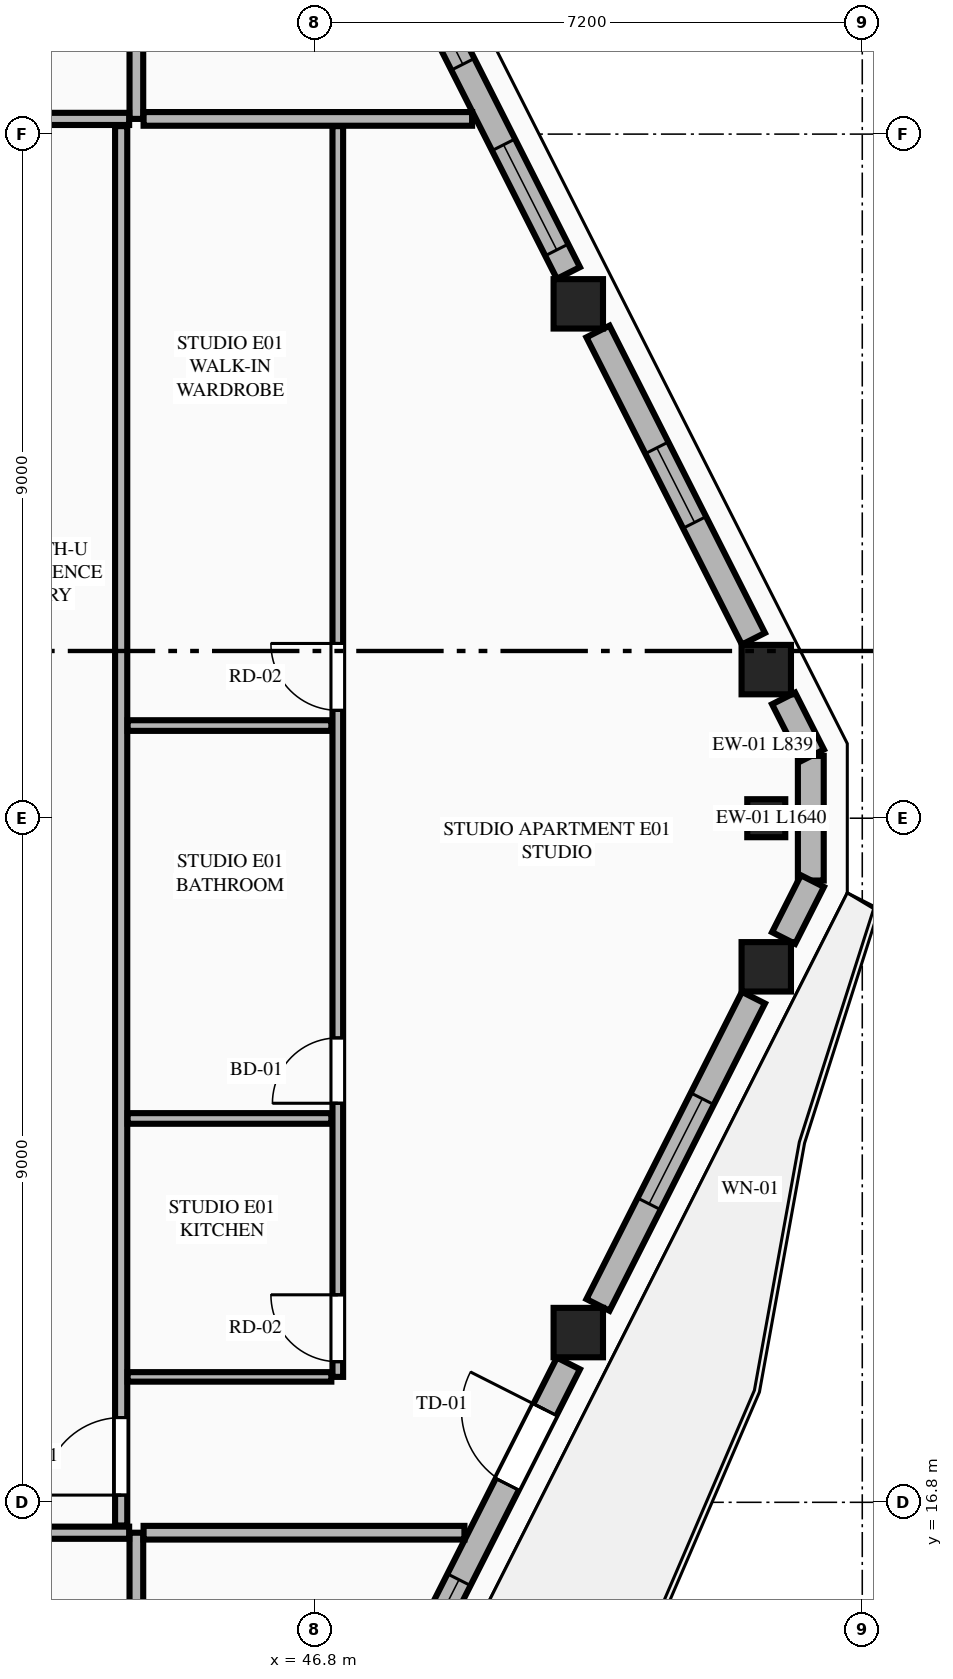
"""IFC4 building model, lengths in metres.
Left out: names, types, materials, properties, quantities, classifications, styles, units other than length and angle.
Written with IfcOpenShell. Run it as: python <this file> out.ifc"""

import sys

from ifc_helpers import new_model, si_unit, direction, frame, frame_2d, origin, origin_2d, place, context, subcontext, project, spatial, rectangle, extrude, element, fill, save


model = new_model("IFC4")
c1 = context("Model", 3, precision=1e-05, world=origin(), true_north=direction((0.0, 1.0)))
c2 = subcontext(c1, "Body", "Model", "MODEL_VIEW")
j1 = project(units=[si_unit("LENGTHUNIT", "METRE"), si_unit("PLANEANGLEUNIT", "RADIAN")], contexts=[c1])
p1 = place(None, origin())
s1 = spatial("IfcSite", under=j1, at=p1, CompositionType="ELEMENT")
p2 = place(p1, origin())
s2 = spatial("IfcBuilding", under=s1, at=p2, CompositionType="ELEMENT")
p3 = place(p2, frame((0.0, 0.0, 270.8)))
s3 = spatial("IfcBuildingStorey", under=s2, at=p3, CompositionType="ELEMENT", Elevation=270.8)
for number, where, z_axis, x_axis in (
    (1, (50.264, 19.033, 0.0), (0.0, 0.0, 1.0), (1.0, 0.0, 0.0)),
    (2, (52.737, 23.845, 0.0), (0.0, 0.0, 1.0), (1.0, 0.0, 0.0)),
    (3, (52.737, 27.755, 0.0), (0.0, 0.0, 1.0), (1.0, 0.0, 0.0)),
    (4, (50.264, 32.567, 0.0), (0.0, 0.0, 1.0), (1.0, 0.0, 0.0)),
):
    element("IfcColumn", number, at=place(p3, frame(where, z_axis=z_axis, x_axis=x_axis)), inside=s3, PredefinedType="COLUMN", context=c2, shape_type="SweptSolid", body=[
        extrude(rectangle(XDim=0.65, YDim=0.65, at=origin_2d()), origin(), (0.0, 0.0, 1.0), 3.65),
    ])
p4 = place(p3, frame((52.737, 25.8, 0.0), z_axis=(0.0, 0.0, 1.0), x_axis=(0.0, 1.0, 0.0)))
e5 = element("IfcColumn", 5, at=p4, inside=s3, PredefinedType="PILASTER", context=c2, shape_type="SweptSolid", body=[
    extrude(rectangle(XDim=0.5, YDim=0.35, at=origin_2d()), origin(), (0.0, 0.0, 1.0), 3.65),
])
p5 = place(p3, frame((53.323, 24.98, 0.0), z_axis=(0.0, 0.0, 1.0), x_axis=(0.0, 1.0, 0.0)))
e6 = element("IfcWall", 6, at=p5, inside=s3, PredefinedType="STANDARD", context=c2, shape_type="SweptSolid", body=[
    extrude(rectangle(XDim=1.64, YDim=0.34, at=frame_2d((0.82, 0.0))), origin(), (0.0, 0.0, 1.0), 3.45),
])
p6 = place(p3, frame((48.002, 14.413, 0.0), z_axis=(0.0, 0.0, 1.0), x_axis=(0.451468341582, 0.892287137949, 0.0)))
e7 = element("IfcWall", 7, at=p6, inside=s3, PredefinedType="STANDARD", context=c2, shape_type="SweptSolid", body=[
    extrude(rectangle(XDim=4.723, YDim=0.34, at=frame_2d((2.361, 0.0))), origin(), (0.0, 0.0, 1.0), 2.983),
])
p7 = place(p6, frame((2.941, 0.0, 0.0)))
e8 = element("IfcOpeningElement", 8, at=p7, cuts=e7, PredefinedType="OPENING", context=c2, shape_type="SweptSolid", body=[
    extrude(rectangle(XDim=1.1, YDim=2.25, at=frame_2d((0.55, 1.125))), frame((0.0, 0.18, 0.0), z_axis=(0.0, -1.0, 0.0), x_axis=(1.0, 0.0, 0.0)), (0.0, 0.0, 1.0), 0.36),
])
p8 = place(p6, frame((0.434, 0.0, 0.75)))
e9 = element("IfcOpeningElement", 9, at=p8, cuts=e7, PredefinedType="OPENING", context=c2, shape_type="SweptSolid", body=[
    extrude(rectangle(XDim=1.1, YDim=2.0, at=frame_2d((0.55, 1.0))), frame((0.0, 0.18, 0.0), z_axis=(0.0, -1.0, 0.0), x_axis=(1.0, 0.0, 0.0)), (0.0, 0.0, 1.0), 0.36),
])
p9 = place(p3, frame((50.523, 19.397, 0.0), z_axis=(0.0, 0.0, 1.0), x_axis=(0.45147697324, 0.892282770558, 0.0)))
e10 = element("IfcWall", 10, at=p9, inside=s3, PredefinedType="STANDARD", context=c2, shape_type="SweptSolid", body=[
    extrude(rectangle(XDim=4.53, YDim=0.34, at=frame_2d((2.265, 0.0))), origin(), (0.0, 0.0, 1.0), 2.983),
])
p10 = place(p9, frame((1.49, 0.0, 0.75)))
e11 = element("IfcOpeningElement", 11, at=p10, cuts=e10, PredefinedType="OPENING", context=c2, shape_type="SweptSolid", body=[
    extrude(rectangle(XDim=1.55, YDim=2.05, at=frame_2d((0.775, 1.025))), frame((0.0, 0.18, 0.0), z_axis=(0.0, -1.0, 0.0), x_axis=(1.0, 0.0, 0.0)), (0.0, 0.0, 1.0), 0.36),
])
p11 = place(p3, frame((52.965, 24.224, 0.0), z_axis=(0.0, 0.0, 1.0), x_axis=(0.4515140893, 0.892263989615, 0.0)))
e12 = element("IfcWall", 12, at=p11, inside=s3, PredefinedType="STANDARD", context=c2, shape_type="SweptSolid", body=[
    extrude(rectangle(XDim=0.839, YDim=0.34, at=frame_2d((0.419, 0.0))), origin(), (0.0, 0.0, 1.0), 3.45),
])
p12 = place(p3, frame((53.344, 26.627, 0.0), z_axis=(0.0, 0.0, 1.0), x_axis=(-0.45139691133, 0.892323275748, 0.0)))
e13 = element("IfcWall", 13, at=p12, inside=s3, PredefinedType="STANDARD", context=c2, shape_type="SweptSolid", body=[
    extrude(rectangle(XDim=0.839, YDim=0.34, at=frame_2d((0.42, 0.0))), origin(), (0.0, 0.0, 1.0), 3.45),
])
p13 = place(p3, frame((52.568, 28.161, 0.0), z_axis=(0.0, 0.0, 1.0), x_axis=(-0.45147697324, 0.892282770558, 0.0)))
e14 = element("IfcWall", 14, at=p13, inside=s3, PredefinedType="STANDARD", context=c2, shape_type="SweptSolid", body=[
    extrude(rectangle(XDim=4.53, YDim=0.34, at=frame_2d((2.265, 0.0))), origin(), (0.0, 0.0, 1.0), 2.983),
])
p14 = place(p13, frame((1.715, 0.0, 0.75)))
e15 = element("IfcOpeningElement", 15, at=p14, cuts=e14, PredefinedType="OPENING", context=c2, shape_type="SweptSolid", body=[
    extrude(rectangle(XDim=1.1, YDim=2.0, at=frame_2d((0.55, 1.0))), frame((0.0, 0.18, 0.0), z_axis=(0.0, -1.0, 0.0), x_axis=(1.0, 0.0, 0.0)), (0.0, 0.0, 1.0), 0.36),
])
p15 = place(p3, frame((50.134, 32.973, 0.0), z_axis=(0.0, 0.0, 1.0), x_axis=(-0.451447516904, 0.892297674255, 0.0)))
e16 = element("IfcWall", 16, at=p15, inside=s3, PredefinedType="STANDARD", context=c2, shape_type="SweptSolid", body=[
    extrude(rectangle(XDim=4.723, YDim=0.34, at=frame_2d((2.361, 0.0))), origin(), (0.0, 0.0, 1.0), 2.983),
])
p16 = place(p15, frame((0.34, 0.0, 0.75)))
e17 = element("IfcOpeningElement", 17, at=p16, cuts=e16, PredefinedType="OPENING", context=c2, shape_type="SweptSolid", body=[
    extrude(rectangle(XDim=1.55, YDim=2.05, at=frame_2d((0.775, 1.025))), frame((0.0, 0.18, 0.0), z_axis=(0.0, -1.0, 0.0), x_axis=(1.0, 0.0, 0.0)), (0.0, 0.0, 1.0), 0.36),
])
p17 = place(p15, frame((3.077, 0.0, 0.75)))
e18 = element("IfcOpeningElement", 18, at=p17, cuts=e16, PredefinedType="OPENING", context=c2, shape_type="SweptSolid", body=[
    extrude(rectangle(XDim=1.1, YDim=2.0, at=frame_2d((0.55, 1.0))), frame((0.0, 0.18, 0.0), z_axis=(0.0, -1.0, 0.0), x_axis=(1.0, 0.0, 0.0)), (0.0, 0.0, 1.0), 0.36),
])
p18 = place(p3, frame((44.45, 8.119, 0.0), z_axis=(0.0, 0.0, 1.0), x_axis=(0.0, 1.0, 0.0)))
e19 = element("IfcWall", 19, at=p18, inside=s3, PredefinedType="PARTITIONING", context=c2, shape_type="SweptSolid", body=[
    extrude(rectangle(XDim=8.281, YDim=0.18, at=frame_2d((4.141, 0.0))), origin(), (0.0, 0.0, 1.0), 3.45),
])
p19 = place(p3, frame((35.749, 16.4, 0.0), z_axis=(0.0, 0.0, 1.0), x_axis=(1.0, 0.0, 0.0)))
e20 = element("IfcWall", 20, at=p19, inside=s3, PredefinedType="PARTITIONING", context=c2, shape_type="SweptSolid", body=[
    extrude(rectangle(XDim=8.606, YDim=0.16, at=frame_2d((4.303, 0.0))), origin(), (0.0, 0.0, 1.0), 3.45),
])
p20 = place(p19, frame((0.355, 0.0, 0.0)))
e21 = element("IfcOpeningElement", 21, at=p20, cuts=e20, PredefinedType="OPENING", context=c2, shape_type="SweptSolid", body=[
    extrude(rectangle(XDim=1.02, YDim=2.25, at=frame_2d((0.51, 1.125))), frame((0.0, 0.09, 0.0), z_axis=(0.0, -1.0, 0.0), x_axis=(1.0, 0.0, 0.0)), (0.0, 0.0, 1.0), 0.18),
])
p21 = place(p3, frame((44.45, 35.0, 0.0), z_axis=(0.0, 0.0, 1.0), x_axis=(0.0, 1.0, 0.0)))
e22 = element("IfcWall", 22, at=p21, inside=s3, PredefinedType="PARTITIONING", context=c2, shape_type="SweptSolid", body=[
    extrude(rectangle(XDim=8.481, YDim=0.18, at=frame_2d((4.24, 0.0))), origin(), (0.0, 0.0, 1.0), 3.45),
])
p22 = place(p3, frame((35.749, 35.0, 0.0), z_axis=(0.0, 0.0, 1.0), x_axis=(1.0, 0.0, 0.0)))
e23 = element("IfcWall", 23, at=p22, inside=s3, PredefinedType="PARTITIONING", context=c2, shape_type="SweptSolid", body=[
    extrude(rectangle(XDim=8.606, YDim=0.16, at=frame_2d((4.303, 0.0))), origin(), (0.0, 0.0, 1.0), 3.45),
])
p23 = place(p22, frame((6.351, 0.0, 0.0)))
e24 = element("IfcOpeningElement", 24, at=p23, cuts=e23, PredefinedType="OPENING", context=c2, shape_type="SweptSolid", body=[
    extrude(rectangle(XDim=1.02, YDim=2.25, at=frame_2d((0.51, 1.125))), frame((0.0, 0.09, 0.0), z_axis=(0.0, -1.0, 0.0), x_axis=(1.0, 0.0, 0.0)), (0.0, 0.0, 1.0), 0.18),
])
p24 = place(p3, frame((44.545, 16.4, 0.0), z_axis=(0.0, 0.0, 1.0), x_axis=(1.0, 0.0, 0.0)))
e25 = element("IfcWall", 25, at=p24, inside=s3, PredefinedType="PARTITIONING", context=c2, shape_type="SweptSolid", body=[
    extrude(rectangle(XDim=4.221, YDim=0.18, at=frame_2d((2.111, 0.0))), origin(), (0.0, 0.0, 1.0), 3.45),
])
p25 = place(p3, frame((44.545, 35.0, 0.0), z_axis=(0.0, 0.0, 1.0), x_axis=(1.0, 0.0, 0.0)))
e26 = element("IfcWall", 26, at=p25, inside=s3, PredefinedType="PARTITIONING", context=c2, shape_type="SweptSolid", body=[
    extrude(rectangle(XDim=4.322, YDim=0.18, at=frame_2d((2.161, 0.0))), origin(), (0.0, 0.0, 1.0), 3.45),
])
p26 = place(p3, frame((44.25, 16.495, 0.0), z_axis=(0.0, 0.0, 1.0), x_axis=(0.0, 1.0, 0.0)))
e27 = element("IfcWall", 27, at=p26, inside=s3, PredefinedType="PARTITIONING", context=c2, shape_type="SweptSolid", body=[
    extrude(rectangle(XDim=18.41, YDim=0.16, at=frame_2d((9.205, 0.0))), origin(), (0.0, 0.0, 1.0), 3.137),
])
p27 = place(p26, frame((0.4, 0.0, 0.0)))
e28 = element("IfcOpeningElement", 28, at=p27, cuts=e27, PredefinedType="OPENING", context=c2, shape_type="SweptSolid", body=[
    extrude(rectangle(XDim=1.02, YDim=2.25, at=frame_2d((0.51, 1.125))), frame((0.0, 0.09, 0.0), z_axis=(0.0, -1.0, 0.0), x_axis=(1.0, 0.0, 0.0)), (0.0, 0.0, 1.0), 0.18),
])
p28 = place(p3, frame((44.335, 18.45, 0.0), z_axis=(0.0, 0.0, 1.0), x_axis=(1.0, 0.0, 0.0)))
e29 = element("IfcWall", 29, at=p28, inside=s3, PredefinedType="PARTITIONING", context=c2, shape_type="SweptSolid", body=[
    extrude(rectangle(XDim=2.68, YDim=0.125, at=frame_2d((1.34, 0.0))), origin(), (0.0, 0.0, 1.0), 3.45),
])
p29 = place(p3, frame((47.1, 18.45, 0.0), z_axis=(0.0, 0.0, 1.0), x_axis=(0.0, 1.0, 0.0)))
e30 = element("IfcWall", 30, at=p29, inside=s3, PredefinedType="PLUMBINGWALL", context=c2, shape_type="SweptSolid", body=[
    extrude(rectangle(XDim=16.455, YDim=0.14, at=frame_2d((8.228, 0.0))), origin(), (0.0, 0.0, 1.0), 3.45),
])
p30 = place(p29, frame((3.6, 0.0, 0.0)))
e31 = element("IfcOpeningElement", 31, at=p30, cuts=e30, PredefinedType="OPENING", context=c2, shape_type="SweptSolid", body=[
    extrude(rectangle(XDim=0.86, YDim=2.1, at=frame_2d((0.43, 1.05))), frame((0.0, 0.08, 0.0), z_axis=(0.0, -1.0, 0.0), x_axis=(1.0, 0.0, 0.0)), (0.0, 0.0, 1.0), 0.16),
])
p31 = place(p29, frame((8.769, 0.0, 0.0)))
e32 = element("IfcOpeningElement", 32, at=p31, cuts=e30, PredefinedType="OPENING", context=c2, shape_type="SweptSolid", body=[
    extrude(rectangle(XDim=0.88, YDim=2.15, at=frame_2d((0.44, 1.075))), frame((0.0, 0.08, 0.0), z_axis=(0.0, -1.0, 0.0), x_axis=(1.0, 0.0, 0.0)), (0.0, 0.0, 1.0), 0.16),
])
p32 = place(p29, frame((0.2, 0.0, 0.0)))
e33 = element("IfcOpeningElement", 33, at=p32, cuts=e30, PredefinedType="OPENING", context=c2, shape_type="SweptSolid", body=[
    extrude(rectangle(XDim=0.88, YDim=2.15, at=frame_2d((0.44, 1.075))), frame((0.0, 0.08, 0.0), z_axis=(0.0, -1.0, 0.0), x_axis=(1.0, 0.0, 0.0)), (0.0, 0.0, 1.0), 0.16),
])
for number, where, z_axis, x_axis in (
    (34, (44.335, 21.85, 0.0), (0.0, 0.0, 1.0), (1.0, 0.0, 0.0)),
    (35, (44.335, 27.019, 0.0), (0.0, 0.0, 1.0), (1.0, 0.0, 0.0)),
):
    element("IfcWall", number, at=place(p3, frame(where, z_axis=z_axis, x_axis=x_axis)), inside=s3, PredefinedType="PLUMBINGWALL", context=c2, shape_type="SweptSolid", body=[
        extrude(rectangle(XDim=2.68, YDim=0.14, at=frame_2d((1.34, 0.0))), origin(), (0.0, 0.0, 1.0), 3.45),
    ])
p33 = place(p7, origin())
e36 = element("IfcDoor", 36, at=p33, inside=s3, OperationType="SINGLE_SWING_RIGHT", PredefinedType="DOOR", context=c2, shape_type="SweptSolid", body=[
    extrude(rectangle(XDim=1.1, YDim=2.25, at=frame_2d((0.55, 1.125))), frame((0.0, 0.025, 0.0), z_axis=(0.0, -1.0, 0.0), x_axis=(1.0, 0.0, 0.0)), (0.0, 0.0, 1.0), 0.05),
])
fill(e8, e36)
p34 = place(p10, origin())
e37 = element("IfcWindow", 37, at=p34, inside=s3, PartitioningType="SINGLE_PANEL", PredefinedType="WINDOW", context=c2, shape_type="SweptSolid", body=[
    extrude(rectangle(XDim=1.55, YDim=2.05, at=frame_2d((0.775, 1.025))), frame((0.0, 0.03, 0.0), z_axis=(0.0, -1.0, 0.0), x_axis=(1.0, 0.0, 0.0)), (0.0, 0.0, 1.0), 0.06),
])
fill(e11, e37)
p35 = place(p14, origin())
e38 = element("IfcWindow", 38, at=p35, inside=s3, PartitioningType="SINGLE_PANEL", PredefinedType="WINDOW", context=c2, shape_type="SweptSolid", body=[
    extrude(rectangle(XDim=1.1, YDim=2.0, at=frame_2d((0.55, 1.0))), frame((0.0, 0.03, 0.0), z_axis=(0.0, -1.0, 0.0), x_axis=(1.0, 0.0, 0.0)), (0.0, 0.0, 1.0), 0.06),
])
fill(e15, e38)
p36 = place(p16, origin())
e39 = element("IfcWindow", 39, at=p36, inside=s3, PartitioningType="SINGLE_PANEL", PredefinedType="WINDOW", context=c2, shape_type="SweptSolid", body=[
    extrude(rectangle(XDim=1.55, YDim=2.05, at=frame_2d((0.775, 1.025))), frame((0.0, 0.03, 0.0), z_axis=(0.0, -1.0, 0.0), x_axis=(1.0, 0.0, 0.0)), (0.0, 0.0, 1.0), 0.06),
])
fill(e17, e39)
p37 = place(p30, origin())
e40 = element("IfcDoor", 40, at=p37, inside=s3, OperationType="SINGLE_SWING_LEFT", PredefinedType="DOOR", context=c2, shape_type="SweptSolid", body=[
    extrude(rectangle(XDim=0.86, YDim=2.1, at=frame_2d((0.43, 1.05))), frame((0.0, 0.025, 0.0), z_axis=(0.0, -1.0, 0.0), x_axis=(1.0, 0.0, 0.0)), (0.0, 0.0, 1.0), 0.05),
])
fill(e31, e40)
p38 = place(p31, origin())
e41 = element("IfcDoor", 41, at=p38, inside=s3, OperationType="SINGLE_SWING_RIGHT", PredefinedType="DOOR", context=c2, shape_type="SweptSolid", body=[
    extrude(rectangle(XDim=0.88, YDim=2.15, at=frame_2d((0.44, 1.075))), frame((0.0, 0.025, 0.0), z_axis=(0.0, -1.0, 0.0), x_axis=(1.0, 0.0, 0.0)), (0.0, 0.0, 1.0), 0.05),
])
fill(e32, e41)
p39 = place(p27, origin())
e42 = element("IfcDoor", 42, at=p39, inside=s3, OperationType="SINGLE_SWING_LEFT", PredefinedType="DOOR", context=c2, shape_type="SweptSolid", body=[
    extrude(rectangle(XDim=1.02, YDim=2.25, at=frame_2d((0.51, 1.125))), frame((0.0, 0.025, 0.0), z_axis=(0.0, -1.0, 0.0), x_axis=(1.0, 0.0, 0.0)), (0.0, 0.0, 1.0), 0.05),
])
fill(e28, e42)
p40 = place(p32, origin())
e43 = element("IfcDoor", 43, at=p40, inside=s3, OperationType="SINGLE_SWING_RIGHT", PredefinedType="DOOR", context=c2, shape_type="SweptSolid", body=[
    extrude(rectangle(XDim=0.88, YDim=2.15, at=frame_2d((0.44, 1.075))), frame((0.0, 0.025, 0.0), z_axis=(0.0, -1.0, 0.0), x_axis=(1.0, 0.0, 0.0)), (0.0, 0.0, 1.0), 0.05),
])
fill(e33, e43)
p41 = place(p8, origin())
e44 = element("IfcWindow", 44, at=p41, inside=s3, PartitioningType="SINGLE_PANEL", PredefinedType="WINDOW", context=c2, shape_type="SweptSolid", body=[
    extrude(rectangle(XDim=1.1, YDim=2.0, at=frame_2d((0.55, 1.0))), frame((0.0, 0.03, 0.0), z_axis=(0.0, -1.0, 0.0), x_axis=(1.0, 0.0, 0.0)), (0.0, 0.0, 1.0), 0.06),
])
fill(e9, e44)
p42 = place(p17, origin())
e45 = element("IfcWindow", 45, at=p42, inside=s3, PartitioningType="SINGLE_PANEL", PredefinedType="WINDOW", context=c2, shape_type="SweptSolid", body=[
    extrude(rectangle(XDim=1.1, YDim=2.0, at=frame_2d((0.55, 1.0))), frame((0.0, 0.03, 0.0), z_axis=(0.0, -1.0, 0.0), x_axis=(1.0, 0.0, 0.0)), (0.0, 0.0, 1.0), 0.06),
])
fill(e18, e45)
save(model, sys.argv[1])
